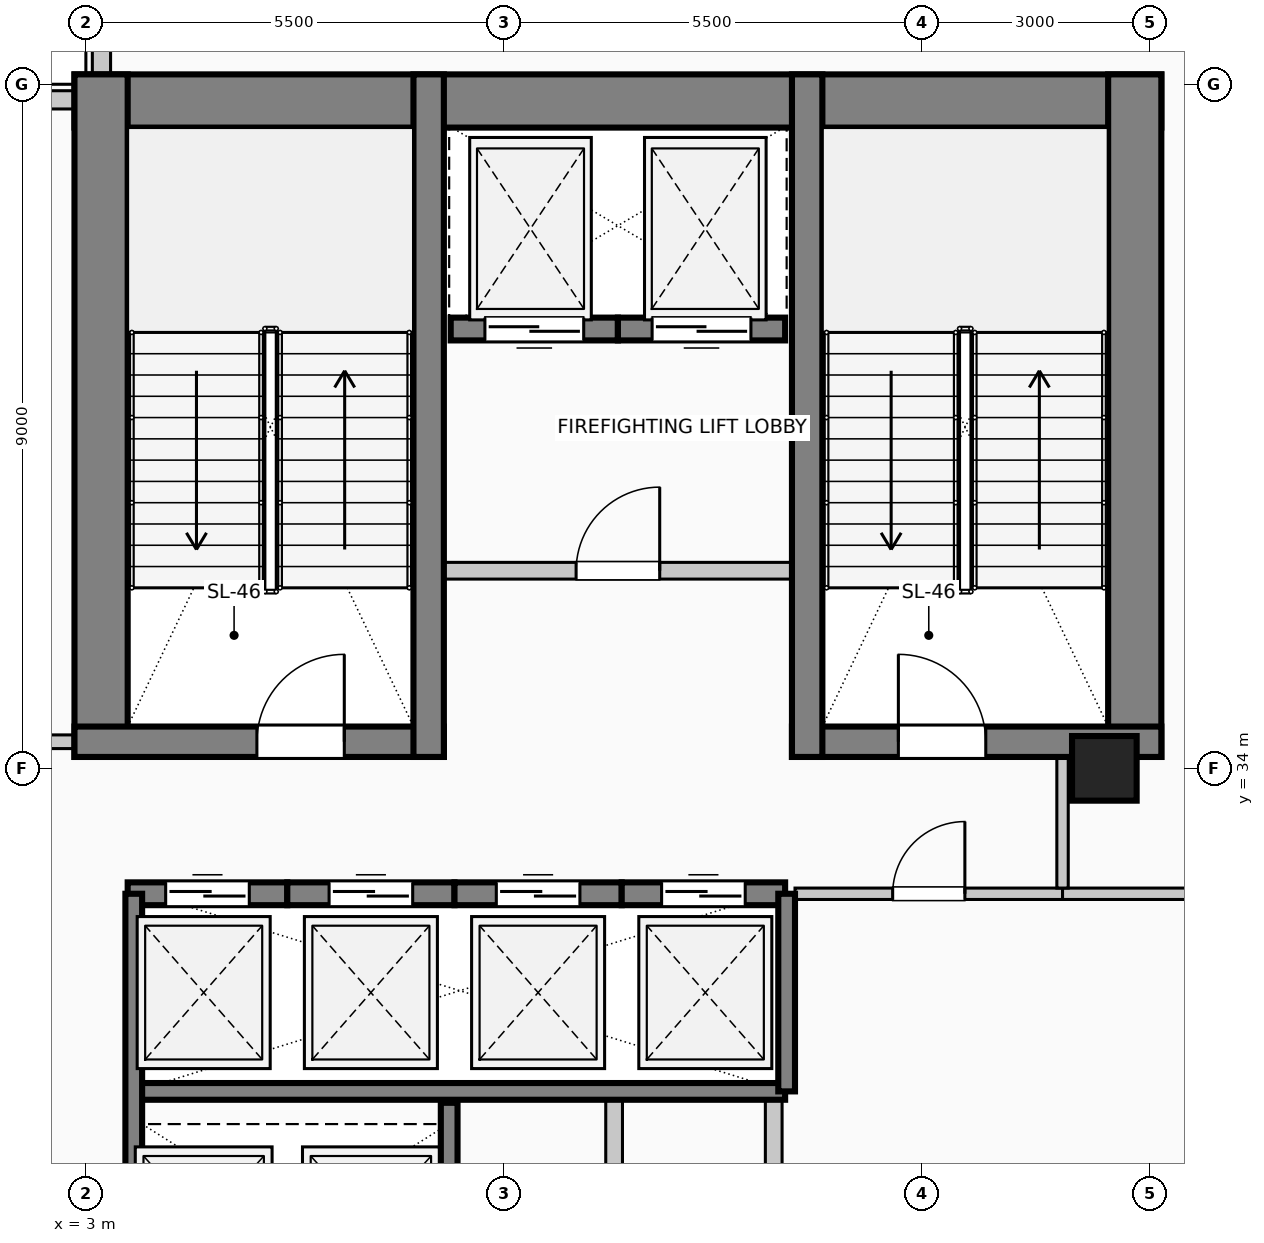
"""IFC4 building model, lengths in metres.
Left out: names, types, materials, properties, quantities, classifications, styles, units other than length and angle.
Written with IfcOpenShell. Run it as: python <this file> out.ifc"""

import sys

from ifc_helpers import new_model, si_unit, direction, frame, frame_2d, origin, origin_2d, place, context, subcontext, project, spatial, rectangle, circle, extrude, element, fill, save


model = new_model("IFC4")
c1 = context("Model", 3, precision=1e-05, world=origin(), true_north=direction((0.0, 1.0)))
c2 = subcontext(c1, "Body", "Model", "MODEL_VIEW")
j1 = project(units=[si_unit("LENGTHUNIT", "METRE"), si_unit("PLANEANGLEUNIT", "RADIAN")], contexts=[c1])
p1 = place(None, origin())
s1 = spatial("IfcSite", under=j1, at=p1, CompositionType="ELEMENT")
p2 = place(p1, origin())
s2 = spatial("IfcBuilding", under=s1, at=p2, CompositionType="ELEMENT")
p3 = place(p2, frame((0.0, 0.0, 243.8)))
s3 = spatial("IfcBuildingStorey", under=s2, at=p3, CompositionType="ELEMENT", Elevation=243.8)
p4 = place(p3, frame((2.85, 42.78, 0.0), z_axis=(0.0, 0.0, 1.0), x_axis=(1.0, 0.0, 0.0)))
e1 = element("IfcWall", 1, at=p4, inside=s3, PredefinedType="SHEAR", context=c2, shape_type="SweptSolid", body=[
    extrude(rectangle(XDim=14.3, YDim=0.7, at=frame_2d((7.15, 0.0))), origin(), (0.0, 0.0, 1.0), 4.8),
])
for number, where, z_axis, x_axis in (
    (2, (3.2, 34.15, 0.0), (0.0, 0.0, 1.0), (0.0, 1.0, 0.0)),
    (3, (16.8, 34.15, 0.0), (0.0, 0.0, 1.0), (0.0, 1.0, 0.0)),
):
    element("IfcWall", number, at=place(p3, frame(where, z_axis=z_axis, x_axis=x_axis)), inside=s3, PredefinedType="SHEAR", context=c2, shape_type="SweptSolid", body=[
        extrude(rectangle(XDim=8.98, YDim=0.7, at=frame_2d((4.49, 0.0))), origin(), (0.0, 0.0, 1.0), 4.8),
    ])
p5 = place(p3, frame((2.85, 34.35, 0.0), z_axis=(0.0, 0.0, 1.0), x_axis=(1.0, 0.0, 0.0)))
e4 = element("IfcWall", 4, at=p5, inside=s3, PredefinedType="SHEAR", context=c2, shape_type="SweptSolid", body=[
    extrude(rectangle(XDim=4.86, YDim=0.4, at=frame_2d((2.43, 0.0))), origin(), (0.0, 0.0, 1.0), 4.8),
])
p6 = place(p5, frame((2.4, 0.0, 0.0)))
e5 = element("IfcOpeningElement", 5, at=p6, cuts=e4, PredefinedType="OPENING", context=c2, shape_type="SweptSolid", body=[
    extrude(rectangle(XDim=1.15, YDim=2.2, at=frame_2d((0.575, 1.1))), frame((0.0, 0.21, 0.0), z_axis=(0.0, -1.0, 0.0), x_axis=(1.0, 0.0, 0.0)), (0.0, 0.0, 1.0), 0.42),
])
p7 = place(p3, frame((12.29, 34.35, 0.0), z_axis=(0.0, 0.0, 1.0), x_axis=(1.0, 0.0, 0.0)))
e6 = element("IfcWall", 6, at=p7, inside=s3, PredefinedType="SHEAR", context=c2, shape_type="SweptSolid", body=[
    extrude(rectangle(XDim=4.86, YDim=0.4, at=frame_2d((2.43, 0.0))), origin(), (0.0, 0.0, 1.0), 4.8),
])
p8 = place(p7, frame((1.4, 0.0, 0.0)))
e7 = element("IfcOpeningElement", 7, at=p8, cuts=e6, PredefinedType="OPENING", context=c2, shape_type="SweptSolid", body=[
    extrude(rectangle(XDim=1.15, YDim=2.2, at=frame_2d((0.575, 1.1))), frame((0.0, 0.21, 0.0), z_axis=(0.0, -1.0, 0.0), x_axis=(1.0, 0.0, 0.0)), (0.0, 0.0, 1.0), 0.42),
])
for number, where, z_axis, x_axis in (
    (8, (7.51, 34.15, 0.0), (0.0, 0.0, 1.0), (0.0, 1.0, 0.0)),
    (9, (12.49, 34.15, 0.0), (0.0, 0.0, 1.0), (0.0, 1.0, 0.0)),
):
    element("IfcWall", number, at=place(p3, frame(where, z_axis=z_axis, x_axis=x_axis)), inside=s3, PredefinedType="SHEAR", context=c2, shape_type="SweptSolid", body=[
        extrude(rectangle(XDim=8.98, YDim=0.4, at=frame_2d((4.49, 0.0))), origin(), (0.0, 0.0, 1.0), 4.8),
    ])
p9 = place(p3, frame((16.4, 34.0, 0.0), z_axis=(0.0, 0.0, 1.0), x_axis=(1.0, 0.0, 0.0)))
e10 = element("IfcColumn", 10, at=p9, inside=s3, PredefinedType="COLUMN", context=c2, shape_type="SweptSolid", body=[
    extrude(circle(Radius=0.425, at=origin_2d()), origin(), (0.0, 0.0, 1.0), 4.8),
])
p10 = place(p3, frame((0.6, 42.795, 0.0), z_axis=(0.0, 0.0, 1.0), x_axis=(1.0, 0.0, 0.0)))
e11 = element("IfcWall", 11, at=p10, inside=s3, PredefinedType="SOLIDWALL", context=c2, shape_type="SweptSolid", body=[
    extrude(rectangle(XDim=2.245, YDim=0.24, at=frame_2d((1.123, 0.0))), origin(), (0.0, 0.0, 1.0), 4.55),
])
p11 = place(p3, frame((3.205, 43.135, 0.0), z_axis=(0.0, 0.0, 1.0), x_axis=(0.0, 1.0, 0.0)))
e12 = element("IfcWall", 12, at=p11, inside=s3, PredefinedType="SOLIDWALL", context=c2, shape_type="SweptSolid", body=[
    extrude(rectangle(XDim=2.265, YDim=0.24, at=frame_2d((1.132, 0.0))), origin(), (0.0, 0.0, 1.0), 4.55),
])
p12 = place(p3, frame((3.55, 32.35, 0.0), z_axis=(0.0, 0.0, 1.0), x_axis=(1.0, 0.0, 0.0)))
e13 = element("IfcWall", 13, at=p12, inside=s3, PredefinedType="SOLIDWALL", context=c2, shape_type="SweptSolid", body=[
    extrude(rectangle(XDim=2.1, YDim=0.3, at=frame_2d((1.05, 0.0))), origin(), (0.0, 0.0, 1.0), 4.8),
])
p13 = place(p12, frame((0.5, 0.0, 0.0)))
e14 = element("IfcOpeningElement", 14, at=p13, cuts=e13, PredefinedType="OPENING", context=c2, shape_type="SweptSolid", body=[
    extrude(rectangle(XDim=1.1, YDim=2.2, at=frame_2d((0.55, 1.1))), frame((0.0, 0.16, 0.0), z_axis=(0.0, -1.0, 0.0), x_axis=(1.0, 0.0, 0.0)), (0.0, 0.0, 1.0), 0.32),
])
p14 = place(p3, frame((5.65, 32.35, 0.0), z_axis=(0.0, 0.0, 1.0), x_axis=(1.0, 0.0, 0.0)))
e15 = element("IfcWall", 15, at=p14, inside=s3, PredefinedType="SOLIDWALL", context=c2, shape_type="SweptSolid", body=[
    extrude(rectangle(XDim=2.2, YDim=0.3, at=frame_2d((1.1, 0.0))), origin(), (0.0, 0.0, 1.0), 4.8),
])
p15 = place(p14, frame((0.55, 0.0, 0.0)))
e16 = element("IfcOpeningElement", 16, at=p15, cuts=e15, PredefinedType="OPENING", context=c2, shape_type="SweptSolid", body=[
    extrude(rectangle(XDim=1.1, YDim=2.2, at=frame_2d((0.55, 1.1))), frame((0.0, 0.16, 0.0), z_axis=(0.0, -1.0, 0.0), x_axis=(1.0, 0.0, 0.0)), (0.0, 0.0, 1.0), 0.32),
])
p16 = place(p3, frame((7.85, 32.35, 0.0), z_axis=(0.0, 0.0, 1.0), x_axis=(1.0, 0.0, 0.0)))
e17 = element("IfcWall", 17, at=p16, inside=s3, PredefinedType="SOLIDWALL", context=c2, shape_type="SweptSolid", body=[
    extrude(rectangle(XDim=2.2, YDim=0.3, at=frame_2d((1.1, 0.0))), origin(), (0.0, 0.0, 1.0), 4.8),
])
p17 = place(p16, frame((0.55, 0.0, 0.0)))
e18 = element("IfcOpeningElement", 18, at=p17, cuts=e17, PredefinedType="OPENING", context=c2, shape_type="SweptSolid", body=[
    extrude(rectangle(XDim=1.1, YDim=2.2, at=frame_2d((0.55, 1.1))), frame((0.0, 0.16, 0.0), z_axis=(0.0, -1.0, 0.0), x_axis=(1.0, 0.0, 0.0)), (0.0, 0.0, 1.0), 0.32),
])
p18 = place(p3, frame((10.05, 32.35, 0.0), z_axis=(0.0, 0.0, 1.0), x_axis=(1.0, 0.0, 0.0)))
e19 = element("IfcWall", 19, at=p18, inside=s3, PredefinedType="SOLIDWALL", context=c2, shape_type="SweptSolid", body=[
    extrude(rectangle(XDim=2.15, YDim=0.3, at=frame_2d((1.075, 0.0))), origin(), (0.0, 0.0, 1.0), 4.8),
])
p19 = place(p18, frame((0.525, 0.0, 0.0)))
e20 = element("IfcOpeningElement", 20, at=p19, cuts=e19, PredefinedType="OPENING", context=c2, shape_type="SweptSolid", body=[
    extrude(rectangle(XDim=1.1, YDim=2.2, at=frame_2d((0.55, 1.1))), frame((0.0, 0.16, 0.0), z_axis=(0.0, -1.0, 0.0), x_axis=(1.0, 0.0, 0.0)), (0.0, 0.0, 1.0), 0.32),
])
p20 = place(p3, frame((10.0, 39.78, 0.0), z_axis=(0.0, 0.0, 1.0), x_axis=(-1.0, 0.0, 0.0)))
e21 = element("IfcWall", 21, at=p20, inside=s3, PredefinedType="SOLIDWALL", context=c2, shape_type="SweptSolid", body=[
    extrude(rectangle(XDim=2.2, YDim=0.3, at=frame_2d((1.1, 0.0))), origin(), (0.0, 0.0, 1.0), 4.8),
])
p21 = place(p20, frame((0.45, 0.0, 0.0)))
e22 = element("IfcOpeningElement", 22, at=p21, cuts=e21, PredefinedType="OPENING", context=c2, shape_type="SweptSolid", body=[
    extrude(rectangle(XDim=1.3, YDim=2.25, at=frame_2d((0.65, 1.125))), frame((0.0, 0.16, 0.0), z_axis=(0.0, -1.0, 0.0), x_axis=(1.0, 0.0, 0.0)), (0.0, 0.0, 1.0), 0.32),
])
p22 = place(p3, frame((12.2, 39.78, 0.0), z_axis=(0.0, 0.0, 1.0), x_axis=(-1.0, 0.0, 0.0)))
e23 = element("IfcWall", 23, at=p22, inside=s3, PredefinedType="SOLIDWALL", context=c2, shape_type="SweptSolid", body=[
    extrude(rectangle(XDim=2.2, YDim=0.3, at=frame_2d((1.1, 0.0))), origin(), (0.0, 0.0, 1.0), 4.8),
])
p23 = place(p22, frame((0.45, 0.0, 0.0)))
e24 = element("IfcOpeningElement", 24, at=p23, cuts=e23, PredefinedType="OPENING", context=c2, shape_type="SweptSolid", body=[
    extrude(rectangle(XDim=1.3, YDim=2.25, at=frame_2d((0.65, 1.125))), frame((0.0, 0.16, 0.0), z_axis=(0.0, -1.0, 0.0), x_axis=(1.0, 0.0, 0.0)), (0.0, 0.0, 1.0), 0.32),
])
p24 = place(p3, frame((3.55, 29.75, 0.0), z_axis=(0.0, 0.0, 1.0), x_axis=(1.0, 0.0, 0.0)))
e25 = element("IfcWall", 25, at=p24, inside=s3, PredefinedType="SOLIDWALL", context=c2, shape_type="SweptSolid", body=[
    extrude(rectangle(XDim=8.65, YDim=0.22, at=frame_2d((4.325, 0.0))), origin(), (0.0, 0.0, 1.0), 4.8),
])
p25 = place(p3, frame((3.63, 26.8, 0.0), z_axis=(0.0, 0.0, 1.0), x_axis=(0.0, 1.0, 0.0)))
e26 = element("IfcWall", 26, at=p25, inside=s3, PredefinedType="SOLIDWALL", context=c2, shape_type="SweptSolid", body=[
    extrude(rectangle(XDim=5.55, YDim=0.22, at=frame_2d((2.775, 0.0))), origin(), (0.0, 0.0, 1.0), 4.8),
])
p26 = place(p3, frame((7.78, 26.8, 0.0), z_axis=(0.0, 0.0, 1.0), x_axis=(0.0, 1.0, 0.0)))
e27 = element("IfcWall", 27, at=p26, inside=s3, PredefinedType="SOLIDWALL", context=c2, shape_type="SweptSolid", body=[
    extrude(rectangle(XDim=2.8, YDim=0.22, at=frame_2d((1.4, 0.0))), origin(), (0.0, 0.0, 1.0), 4.8),
])
p27 = place(p3, frame((12.22, 29.75, 0.0), z_axis=(0.0, 0.0, 1.0), x_axis=(0.0, 1.0, 0.0)))
e28 = element("IfcWall", 28, at=p27, inside=s3, PredefinedType="SOLIDWALL", context=c2, shape_type="SweptSolid", body=[
    extrude(rectangle(XDim=2.6, YDim=0.22, at=frame_2d((1.3, 0.0))), origin(), (0.0, 0.0, 1.0), 4.8),
])
p28 = place(p3, frame((7.51, 36.6, 0.0), z_axis=(0.0, 0.0, 1.0), x_axis=(1.0, 0.0, 0.0)))
e29 = element("IfcWall", 29, at=p28, inside=s3, PredefinedType="PARTITIONING", context=c2, shape_type="SweptSolid", body=[
    extrude(rectangle(XDim=4.98, YDim=0.22, at=frame_2d((2.49, 0.0))), origin(), (0.0, 0.0, 1.0), 4.55),
])
p29 = place(p28, frame((1.94, 0.0, 0.0)))
e30 = element("IfcOpeningElement", 30, at=p29, cuts=e29, PredefinedType="OPENING", context=c2, shape_type="SweptSolid", body=[
    extrude(rectangle(XDim=1.1, YDim=2.2, at=frame_2d((0.55, 1.1))), frame((0.0, 0.12, 0.0), z_axis=(0.0, -1.0, 0.0), x_axis=(1.0, 0.0, 0.0)), (0.0, 0.0, 1.0), 0.24),
])
p30 = place(p3, frame((12.33, 32.35, 0.0), z_axis=(0.0, 0.0, 1.0), x_axis=(1.0, 0.0, 0.0)))
e31 = element("IfcWall", 31, at=p30, inside=s3, PredefinedType="PARTITIONING", context=c2, shape_type="SweptSolid", body=[
    extrude(rectangle(XDim=3.52, YDim=0.15, at=frame_2d((1.76, 0.0))), origin(), (0.0, 0.0, 1.0), 4.55),
])
p31 = place(p30, frame((1.285, 0.0, 0.0)))
e32 = element("IfcOpeningElement", 32, at=p31, cuts=e31, PredefinedType="OPENING", context=c2, shape_type="SweptSolid", body=[
    extrude(rectangle(XDim=0.95, YDim=2.15, at=frame_2d((0.475, 1.075))), frame((0.0, 0.085, 0.0), z_axis=(0.0, -1.0, 0.0), x_axis=(1.0, 0.0, 0.0)), (0.0, 0.0, 1.0), 0.17),
])
p32 = place(p3, frame((15.85, 32.35, 0.0), z_axis=(0.0, 0.0, 1.0), x_axis=(1.0, 0.0, 0.0)))
e33 = element("IfcWall", 33, at=p32, inside=s3, PredefinedType="PARTITIONING", context=c2, shape_type="SweptSolid", body=[
    extrude(rectangle(XDim=5.15, YDim=0.15, at=frame_2d((2.575, 0.0))), origin(), (0.0, 0.0, 1.0), 4.55),
])
p33 = place(p3, frame((1.1, 34.35, 0.0), z_axis=(0.0, 0.0, 1.0), x_axis=(1.0, 0.0, 0.0)))
e34 = element("IfcWall", 34, at=p33, inside=s3, PredefinedType="PARTITIONING", context=c2, shape_type="SweptSolid", body=[
    extrude(rectangle(XDim=1.75, YDim=0.18, at=frame_2d((0.875, 0.0))), origin(), (0.0, 0.0, 1.0), 4.55),
])
for number, where, z_axis, x_axis in (
    (35, (9.95, 26.91, 0.0), (0.0, 0.0, 1.0), (0.0, 1.0, 0.0)),
    (36, (12.05, 26.91, 0.0), (0.0, 0.0, 1.0), (0.0, 1.0, 0.0)),
):
    element("IfcWall", number, at=place(p3, frame(where, z_axis=z_axis, x_axis=x_axis)), inside=s3, PredefinedType="PARTITIONING", context=c2, shape_type="SweptSolid", body=[
        extrude(rectangle(XDim=2.73, YDim=0.22, at=frame_2d((1.365, 0.0))), origin(), (0.0, 0.0, 1.0), 4.55),
    ])
p34 = place(p3, frame((15.85, 32.425, 0.0), z_axis=(0.0, 0.0, 1.0), x_axis=(0.0, 1.0, 0.0)))
e37 = element("IfcWall", 37, at=p34, inside=s3, PredefinedType="PARTITIONING", context=c2, shape_type="SweptSolid", body=[
    extrude(rectangle(XDim=1.725, YDim=0.15, at=frame_2d((0.862, 0.0))), origin(), (0.0, 0.0, 1.0), 4.55),
])
p35 = place(p13, origin())
e38 = element("IfcDoor", 38, at=p35, inside=s3, OperationType="SLIDING_TO_LEFT", PredefinedType="DOOR", context=c2, shape_type="SweptSolid", body=[
    extrude(rectangle(XDim=1.1, YDim=2.2, at=frame_2d((0.55, 1.1))), frame((0.0, 0.025, 0.0), z_axis=(0.0, -1.0, 0.0), x_axis=(1.0, 0.0, 0.0)), (0.0, 0.0, 1.0), 0.05),
])
fill(e14, e38)
p36 = place(p15, origin())
e39 = element("IfcDoor", 39, at=p36, inside=s3, OperationType="SLIDING_TO_RIGHT", PredefinedType="DOOR", context=c2, shape_type="SweptSolid", body=[
    extrude(rectangle(XDim=1.1, YDim=2.2, at=frame_2d((0.55, 1.1))), frame((0.0, 0.025, 0.0), z_axis=(0.0, -1.0, 0.0), x_axis=(1.0, 0.0, 0.0)), (0.0, 0.0, 1.0), 0.05),
])
fill(e16, e39)
p37 = place(p17, origin())
e40 = element("IfcDoor", 40, at=p37, inside=s3, OperationType="SLIDING_TO_LEFT", PredefinedType="DOOR", context=c2, shape_type="SweptSolid", body=[
    extrude(rectangle(XDim=1.1, YDim=2.2, at=frame_2d((0.55, 1.1))), frame((0.0, 0.025, 0.0), z_axis=(0.0, -1.0, 0.0), x_axis=(1.0, 0.0, 0.0)), (0.0, 0.0, 1.0), 0.05),
])
fill(e18, e40)
p38 = place(p19, origin())
e41 = element("IfcDoor", 41, at=p38, inside=s3, OperationType="SLIDING_TO_RIGHT", PredefinedType="DOOR", context=c2, shape_type="SweptSolid", body=[
    extrude(rectangle(XDim=1.1, YDim=2.2, at=frame_2d((0.55, 1.1))), frame((0.0, 0.025, 0.0), z_axis=(0.0, -1.0, 0.0), x_axis=(1.0, 0.0, 0.0)), (0.0, 0.0, 1.0), 0.05),
])
fill(e20, e41)
p39 = place(p21, origin())
e42 = element("IfcDoor", 42, at=p39, inside=s3, OperationType="SLIDING_TO_LEFT", PredefinedType="DOOR", context=c2, shape_type="SweptSolid", body=[
    extrude(rectangle(XDim=1.3, YDim=2.25, at=frame_2d((0.65, 1.125))), frame((0.0, 0.025, 0.0), z_axis=(0.0, -1.0, 0.0), x_axis=(1.0, 0.0, 0.0)), (0.0, 0.0, 1.0), 0.05),
])
fill(e22, e42)
p40 = place(p23, origin())
e43 = element("IfcDoor", 43, at=p40, inside=s3, OperationType="SLIDING_TO_RIGHT", PredefinedType="DOOR", context=c2, shape_type="SweptSolid", body=[
    extrude(rectangle(XDim=1.3, YDim=2.25, at=frame_2d((0.65, 1.125))), frame((0.0, 0.025, 0.0), z_axis=(0.0, -1.0, 0.0), x_axis=(1.0, 0.0, 0.0)), (0.0, 0.0, 1.0), 0.05),
])
fill(e24, e43)
p41 = place(p6, origin())
e44 = element("IfcDoor", 44, at=p41, inside=s3, OperationType="SINGLE_SWING_RIGHT", PredefinedType="DOOR", context=c2, shape_type="SweptSolid", body=[
    extrude(rectangle(XDim=1.15, YDim=2.2, at=frame_2d((0.575, 1.1))), frame((0.0, 0.025, 0.0), z_axis=(0.0, -1.0, 0.0), x_axis=(1.0, 0.0, 0.0)), (0.0, 0.0, 1.0), 0.05),
])
fill(e5, e44)
p42 = place(p8, origin())
e45 = element("IfcDoor", 45, at=p42, inside=s3, OperationType="SINGLE_SWING_LEFT", PredefinedType="DOOR", context=c2, shape_type="SweptSolid", body=[
    extrude(rectangle(XDim=1.15, YDim=2.2, at=frame_2d((0.575, 1.1))), frame((0.0, 0.025, 0.0), z_axis=(0.0, -1.0, 0.0), x_axis=(1.0, 0.0, 0.0)), (0.0, 0.0, 1.0), 0.05),
])
fill(e7, e45)
p43 = place(p29, origin())
e46 = element("IfcDoor", 46, at=p43, inside=s3, OperationType="SINGLE_SWING_RIGHT", PredefinedType="DOOR", context=c2, shape_type="SweptSolid", body=[
    extrude(rectangle(XDim=1.1, YDim=2.2, at=frame_2d((0.55, 1.1))), frame((0.0, 0.025, 0.0), z_axis=(0.0, -1.0, 0.0), x_axis=(1.0, 0.0, 0.0)), (0.0, 0.0, 1.0), 0.05),
])
fill(e30, e46)
p44 = place(p31, origin())
e47 = element("IfcDoor", 47, at=p44, inside=s3, OperationType="SINGLE_SWING_RIGHT", PredefinedType="DOOR", context=c2, shape_type="SweptSolid", body=[
    extrude(rectangle(XDim=0.95, YDim=2.15, at=frame_2d((0.475, 1.075))), frame((0.0, 0.025, 0.0), z_axis=(0.0, -1.0, 0.0), x_axis=(1.0, 0.0, 0.0)), (0.0, 0.0, 1.0), 0.05),
])
fill(e32, e47)
save(model, sys.argv[1])
